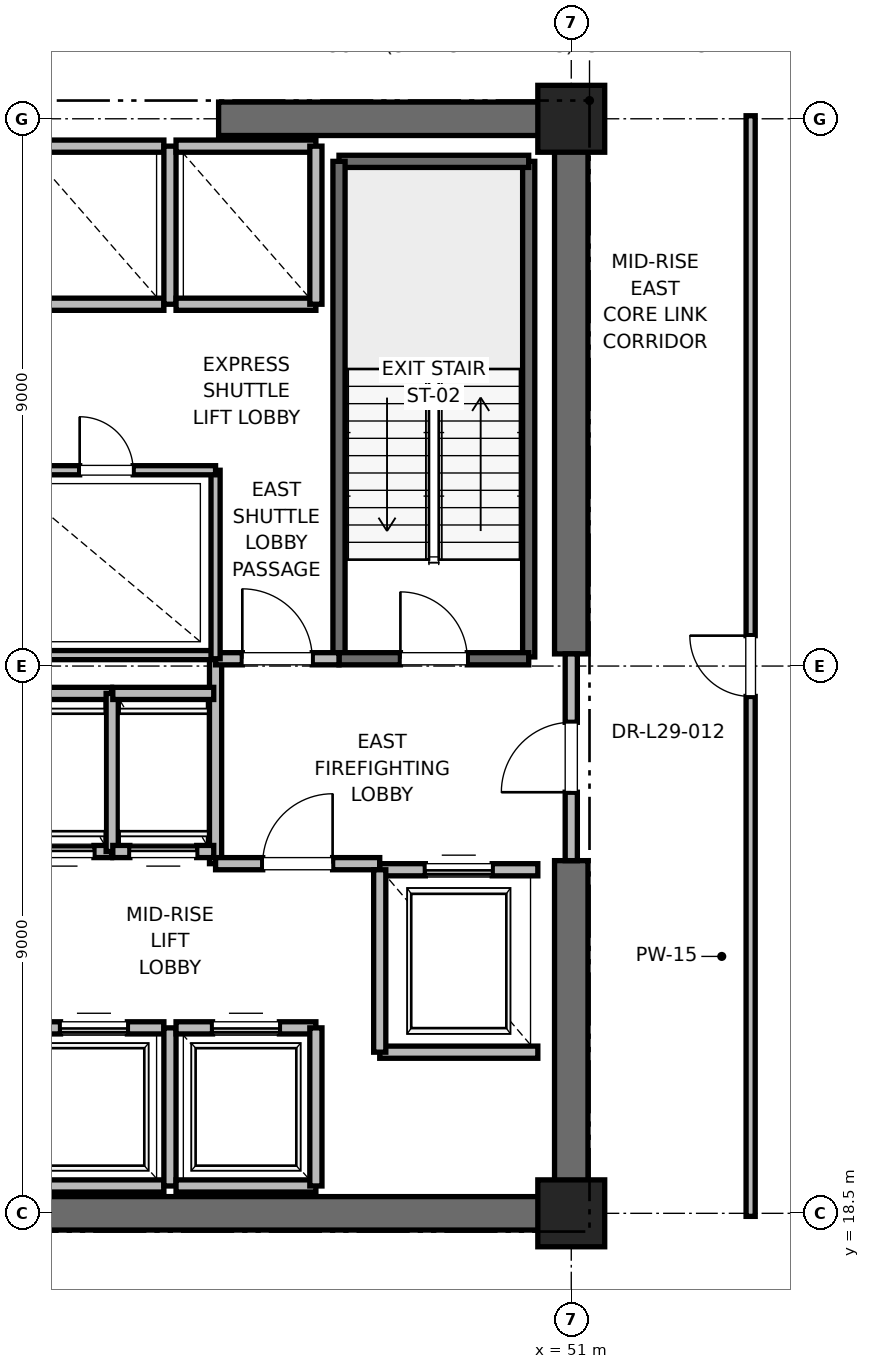
"""IFC4 building model, lengths in metres.
Left out: names, types, materials, properties, quantities, classifications, styles, units other than length and angle.
Written with IfcOpenShell. Run it as: python <this file> out.ifc"""

import sys

from ifc_helpers import new_model, si_unit, direction, frame, frame_2d, origin, origin_2d, place, context, subcontext, project, spatial, rectangle, extrude, element, fill, save


model = new_model("IFC4")
c1 = context("Model", 3, precision=1e-05, world=origin(), true_north=direction((0.0, 1.0)))
c2 = subcontext(c1, "Body", "Model", "MODEL_VIEW")
j1 = project(units=[si_unit("LENGTHUNIT", "METRE"), si_unit("PLANEANGLEUNIT", "RADIAN")], contexts=[c1])
p1 = place(None, origin())
s1 = spatial("IfcSite", under=j1, at=p1, CompositionType="ELEMENT")
p2 = place(p1, origin())
s2 = spatial("IfcBuilding", under=s1, at=p2, CompositionType="ELEMENT")
p3 = place(p2, frame((0.0, 0.0, 128.4)))
s3 = spatial("IfcBuildingStorey", under=s2, at=p3, CompositionType="ELEMENT", Elevation=128.4)
for number, where, z_axis, x_axis in (
    (1, (51.0, 18.5, 0.0), (0.0, 0.0, 1.0), (1.0, 0.0, 0.0)),
    (2, (51.0, 36.5, 0.0), (0.0, 0.0, 1.0), (1.0, 0.0, 0.0)),
):
    element("IfcColumn", number, at=place(p3, frame(where, z_axis=z_axis, x_axis=x_axis)), inside=s3, PredefinedType="PILASTER", context=c2, shape_type="SweptSolid", body=[
        extrude(rectangle(XDim=1.1, YDim=1.1, at=origin_2d()), origin(), (0.0, 0.0, 1.0), 4.0),
    ])
p4 = place(p3, frame((41.8, 18.5, 0.0), z_axis=(0.0, 0.0, 1.0), x_axis=(1.0, 0.0, 0.0)))
e3 = element("IfcWall", 3, at=p4, inside=s3, PredefinedType="SHEAR", context=c2, shape_type="SweptSolid", body=[
    extrude(rectangle(XDim=9.2, YDim=0.55, at=frame_2d((4.6, 0.0))), origin(), (0.0, 0.0, 1.0), 3.775),
])
for number, where, z_axis, x_axis in (
    (4, (45.2, 36.5, 0.0), (0.0, 0.0, 1.0), (1.0, 0.0, 0.0)),
    (5, (51.0, 18.5, 0.0), (0.0, 0.0, 1.0), (0.0, 1.0, 0.0)),
):
    element("IfcWall", number, at=place(p3, frame(where, z_axis=z_axis, x_axis=x_axis)), inside=s3, PredefinedType="SHEAR", context=c2, shape_type="SweptSolid", body=[
        extrude(rectangle(XDim=5.8, YDim=0.55, at=frame_2d((2.9, 0.0))), origin(), (0.0, 0.0, 1.0), 3.775),
    ])
p5 = place(p3, frame((51.0, 27.7, 0.0), z_axis=(0.0, 0.0, 1.0), x_axis=(0.0, 1.0, 0.0)))
e6 = element("IfcWall", 6, at=p5, inside=s3, PredefinedType="SHEAR", context=c2, shape_type="SweptSolid", body=[
    extrude(rectangle(XDim=8.8, YDim=0.55, at=frame_2d((4.4, 0.0))), origin(), (0.0, 0.0, 1.0), 3.775),
])
p6 = place(p3, frame((50.3, 27.65, 0.0), z_axis=(0.0, 0.0, 1.0), x_axis=(0.0, 1.0, 0.0)))
e7 = element("IfcWall", 7, at=p6, inside=s3, PredefinedType="SOLIDWALL", context=c2, shape_type="SweptSolid", body=[
    extrude(rectangle(XDim=8.15, YDim=0.2, at=frame_2d((4.075, 0.0))), origin(), (0.0, 0.0, 1.0), 3.775),
])
p7 = place(p3, frame((47.18, 35.8, 0.0), z_axis=(0.0, 0.0, 1.0), x_axis=(1.0, 0.0, 0.0)))
e8 = element("IfcWall", 8, at=p7, inside=s3, PredefinedType="SOLIDWALL", context=c2, shape_type="SweptSolid", body=[
    extrude(rectangle(XDim=3.12, YDim=0.2, at=frame_2d((1.56, 0.0))), origin(), (0.0, 0.0, 1.0), 3.775),
])
p8 = place(p3, frame((47.18, 27.62, 0.0), z_axis=(0.0, 0.0, 1.0), x_axis=(0.0, 1.0, 0.0)))
e9 = element("IfcWall", 9, at=p8, inside=s3, PredefinedType="SOLIDWALL", context=c2, shape_type="SweptSolid", body=[
    extrude(rectangle(XDim=8.18, YDim=0.2, at=frame_2d((4.09, 0.0))), origin(), (0.0, 0.0, 1.0), 3.775),
])
p9 = place(p3, frame((47.18, 27.62, 0.0), z_axis=(0.0, 0.0, 1.0), x_axis=(1.0, 0.0, 0.0)))
e10 = element("IfcWall", 10, at=p9, inside=s3, PredefinedType="SOLIDWALL", context=c2, shape_type="SweptSolid", body=[
    extrude(rectangle(XDim=3.12, YDim=0.2, at=frame_2d((1.56, 0.0))), origin(), (0.0, 0.0, 1.0), 3.775),
])
p10 = place(p9, frame((1.01, 0.0, 0.0)))
e11 = element("IfcOpeningElement", 11, at=p10, cuts=e10, PredefinedType="OPENING", context=c2, shape_type="SweptSolid", body=[
    extrude(rectangle(XDim=1.1, YDim=2.15, at=frame_2d((0.55, 1.075))), frame((0.0, 0.1, 0.0), z_axis=(0.0, -1.0, 0.0), x_axis=(1.0, 0.0, 0.0)), (0.0, 0.0, 1.0), 0.2),
])
p11 = place(p3, frame((45.15, 24.25, 0.0), z_axis=(0.0, 0.0, 1.0), x_axis=(0.0, 1.0, 0.0)))
e12 = element("IfcWall", 12, at=p11, inside=s3, PredefinedType="PARTITIONING", context=c2, shape_type="SweptSolid", body=[
    extrude(rectangle(XDim=3.37, YDim=0.2, at=frame_2d((1.685, 0.0))), origin(), (0.0, 0.0, 1.0), 3.775),
])
p12 = place(p3, frame((45.15, 24.25, 0.0), z_axis=(0.0, 0.0, 1.0), x_axis=(1.0, 0.0, 0.0)))
e13 = element("IfcWall", 13, at=p12, inside=s3, PredefinedType="PARTITIONING", context=c2, shape_type="SweptSolid", body=[
    extrude(rectangle(XDim=2.7, YDim=0.2, at=frame_2d((1.35, 0.0))), origin(), (0.0, 0.0, 1.0), 3.775),
])
p13 = place(p12, frame((0.775, 0.0, 0.0)))
e14 = element("IfcOpeningElement", 14, at=p13, cuts=e13, PredefinedType="OPENING", context=c2, shape_type="SweptSolid", body=[
    extrude(rectangle(XDim=1.15, YDim=2.2, at=frame_2d((0.575, 1.1))), frame((0.0, 0.1, 0.0), z_axis=(0.0, -1.0, 0.0), x_axis=(1.0, 0.0, 0.0)), (0.0, 0.0, 1.0), 0.2),
])
p14 = place(p3, frame((45.15, 27.62, 0.0), z_axis=(0.0, 0.0, 1.0), x_axis=(1.0, 0.0, 0.0)))
e15 = element("IfcWall", 15, at=p14, inside=s3, PredefinedType="PARTITIONING", context=c2, shape_type="SweptSolid", body=[
    extrude(rectangle(XDim=2.03, YDim=0.2, at=frame_2d((1.015, 0.0))), origin(), (0.0, 0.0, 1.0), 3.775),
])
p15 = place(p14, frame((0.44, 0.0, 0.0)))
e16 = element("IfcOpeningElement", 16, at=p15, cuts=e15, PredefinedType="OPENING", context=c2, shape_type="SweptSolid", body=[
    extrude(rectangle(XDim=1.15, YDim=2.2, at=frame_2d((0.575, 1.1))), frame((0.0, 0.1, 0.0), z_axis=(0.0, -1.0, 0.0), x_axis=(1.0, 0.0, 0.0)), (0.0, 0.0, 1.0), 0.2),
])
p16 = place(p3, frame((51.0, 24.3, 0.0), z_axis=(0.0, 0.0, 1.0), x_axis=(0.0, 1.0, 0.0)))
e17 = element("IfcWall", 17, at=p16, inside=s3, PredefinedType="PARTITIONING", context=c2, shape_type="SweptSolid", body=[
    extrude(rectangle(XDim=3.4, YDim=0.2, at=frame_2d((1.7, 0.0))), origin(), (0.0, 0.0, 1.0), 2.755),
])
p17 = place(p16, frame((1.125, 0.0, 0.0)))
e18 = element("IfcOpeningElement", 18, at=p17, cuts=e17, PredefinedType="OPENING", context=c2, shape_type="SweptSolid", body=[
    extrude(rectangle(XDim=1.15, YDim=2.2, at=frame_2d((0.575, 1.1))), frame((0.0, 0.1, 0.0), z_axis=(0.0, -1.0, 0.0), x_axis=(1.0, 0.0, 0.0)), (0.0, 0.0, 1.0), 0.2),
])
p18 = place(p3, frame((47.85, 21.15, 0.0), z_axis=(0.0, 0.0, 1.0), x_axis=(1.0, 0.0, 0.0)))
e19 = element("IfcWall", 19, at=p18, inside=s3, PredefinedType="SOLIDWALL", context=c2, shape_type="SweptSolid", body=[
    extrude(rectangle(XDim=2.6, YDim=0.2, at=frame_2d((1.3, 0.0))), origin(), (0.0, 0.0, 1.0), 3.775),
])
p19 = place(p3, frame((50.45, 24.15, 0.0), z_axis=(0.0, 0.0, 1.0), x_axis=(-1.0, 0.0, 0.0)))
e20 = element("IfcWall", 20, at=p19, inside=s3, PredefinedType="SOLIDWALL", context=c2, shape_type="SweptSolid", body=[
    extrude(rectangle(XDim=2.6, YDim=0.2, at=frame_2d((1.3, 0.0))), origin(), (0.0, 0.0, 1.0), 2.755),
])
p20 = place(p19, frame((0.75, 0.0, 0.0)))
e21 = element("IfcOpeningElement", 21, at=p20, cuts=e20, PredefinedType="OPENING", context=c2, shape_type="SweptSolid", body=[
    extrude(rectangle(XDim=1.1, YDim=2.2, at=frame_2d((0.55, 1.1))), frame((0.0, 0.1, 0.0), z_axis=(0.0, -1.0, 0.0), x_axis=(1.0, 0.0, 0.0)), (0.0, 0.0, 1.0), 0.2),
])
p21 = place(p3, frame((47.85, 24.15, 0.0), z_axis=(0.0, 0.0, 1.0), x_axis=(0.0, -1.0, 0.0)))
e22 = element("IfcWall", 22, at=p21, inside=s3, PredefinedType="SOLIDWALL", context=c2, shape_type="SweptSolid", body=[
    extrude(rectangle(XDim=3.0, YDim=0.2, at=frame_2d((1.5, 0.0))), origin(), (0.0, 0.0, 1.0), 3.775),
])
p22 = place(p3, frame((42.0, 18.95, 0.0), z_axis=(0.0, 0.0, 1.0), x_axis=(1.0, 0.0, 0.0)))
e23 = element("IfcWall", 23, at=p22, inside=s3, PredefinedType="SOLIDWALL", context=c2, shape_type="SweptSolid", body=[
    extrude(rectangle(XDim=2.3, YDim=0.2, at=frame_2d((1.15, 0.0))), origin(), (0.0, 0.0, 1.0), 2.755),
])
p23 = place(p3, frame((44.3, 21.55, 0.0), z_axis=(0.0, 0.0, 1.0), x_axis=(-1.0, 0.0, 0.0)))
e24 = element("IfcWall", 24, at=p23, inside=s3, PredefinedType="SOLIDWALL", context=c2, shape_type="SweptSolid", body=[
    extrude(rectangle(XDim=2.3, YDim=0.2, at=frame_2d((1.15, 0.0))), origin(), (0.0, 0.0, 1.0), 3.775),
])
p24 = place(p23, frame((0.6, 0.0, 0.0)))
e25 = element("IfcOpeningElement", 25, at=p24, cuts=e24, PredefinedType="OPENING", context=c2, shape_type="SweptSolid", body=[
    extrude(rectangle(XDim=1.1, YDim=2.2, at=frame_2d((0.55, 1.1))), frame((0.0, 0.1, 0.0), z_axis=(0.0, -1.0, 0.0), x_axis=(1.0, 0.0, 0.0)), (0.0, 0.0, 1.0), 0.2),
])
p25 = place(p3, frame((44.4, 18.95, 0.0), z_axis=(0.0, 0.0, 1.0), x_axis=(0.0, 1.0, 0.0)))
e26 = element("IfcWall", 26, at=p25, inside=s3, PredefinedType="SOLIDWALL", context=c2, shape_type="SweptSolid", body=[
    extrude(rectangle(XDim=2.6, YDim=0.2, at=frame_2d((1.3, 0.0))), origin(), (0.0, 0.0, 1.0), 3.775),
])
p26 = place(p3, frame((44.5, 18.95, 0.0), z_axis=(0.0, 0.0, 1.0), x_axis=(1.0, 0.0, 0.0)))
e27 = element("IfcWall", 27, at=p26, inside=s3, PredefinedType="SOLIDWALL", context=c2, shape_type="SweptSolid", body=[
    extrude(rectangle(XDim=2.3, YDim=0.2, at=frame_2d((1.15, 0.0))), origin(), (0.0, 0.0, 1.0), 3.775),
])
p27 = place(p3, frame((46.8, 21.55, 0.0), z_axis=(0.0, 0.0, 1.0), x_axis=(-1.0, 0.0, 0.0)))
e28 = element("IfcWall", 28, at=p27, inside=s3, PredefinedType="SOLIDWALL", context=c2, shape_type="SweptSolid", body=[
    extrude(rectangle(XDim=2.3, YDim=0.2, at=frame_2d((1.15, 0.0))), origin(), (0.0, 0.0, 1.0), 3.775),
])
p28 = place(p27, frame((0.6, 0.0, 0.0)))
e29 = element("IfcOpeningElement", 29, at=p28, cuts=e28, PredefinedType="OPENING", context=c2, shape_type="SweptSolid", body=[
    extrude(rectangle(XDim=1.1, YDim=2.2, at=frame_2d((0.55, 1.1))), frame((0.0, 0.1, 0.0), z_axis=(0.0, -1.0, 0.0), x_axis=(1.0, 0.0, 0.0)), (0.0, 0.0, 1.0), 0.2),
])
p29 = place(p3, frame((46.8, 18.95, 0.0), z_axis=(0.0, 0.0, 1.0), x_axis=(0.0, 1.0, 0.0)))
e30 = element("IfcWall", 30, at=p29, inside=s3, PredefinedType="SOLIDWALL", context=c2, shape_type="SweptSolid", body=[
    extrude(rectangle(XDim=2.6, YDim=0.2, at=frame_2d((1.3, 0.0))), origin(), (0.0, 0.0, 1.0), 3.775),
])
p30 = place(p3, frame((41.76, 24.45, 0.0), z_axis=(0.0, 0.0, 1.0), x_axis=(1.0, 0.0, 0.0)))
e31 = element("IfcWall", 31, at=p30, inside=s3, PredefinedType="SOLIDWALL", context=c2, shape_type="SweptSolid", body=[
    extrude(rectangle(XDim=1.68, YDim=0.2, at=frame_2d((0.84, 0.0))), origin(), (0.0, 0.0, 1.0), 3.775),
])
p31 = place(p30, frame((0.29, 0.0, 0.0)))
e32 = element("IfcOpeningElement", 32, at=p31, cuts=e31, PredefinedType="OPENING", context=c2, shape_type="SweptSolid", body=[
    extrude(rectangle(XDim=1.1, YDim=2.2, at=frame_2d((0.55, 1.1))), frame((0.0, 0.1, 0.0), z_axis=(0.0, -1.0, 0.0), x_axis=(1.0, 0.0, 0.0)), (0.0, 0.0, 1.0), 0.2),
])
p32 = place(p3, frame((43.44, 27.05, 0.0), z_axis=(0.0, 0.0, 1.0), x_axis=(-1.0, 0.0, 0.0)))
e33 = element("IfcWall", 33, at=p32, inside=s3, PredefinedType="SOLIDWALL", context=c2, shape_type="SweptSolid", body=[
    extrude(rectangle(XDim=1.68, YDim=0.2, at=frame_2d((0.84, 0.0))), origin(), (0.0, 0.0, 1.0), 3.775),
])
p33 = place(p3, frame((43.45, 24.45, 0.0), z_axis=(0.0, 0.0, 1.0), x_axis=(0.0, 1.0, 0.0)))
e34 = element("IfcWall", 34, at=p33, inside=s3, PredefinedType="SOLIDWALL", context=c2, shape_type="SweptSolid", body=[
    extrude(rectangle(XDim=2.6, YDim=0.2, at=frame_2d((1.3, 0.0))), origin(), (0.0, 0.0, 1.0), 3.775),
])
p34 = place(p3, frame((43.46, 24.45, 0.0), z_axis=(0.0, 0.0, 1.0), x_axis=(1.0, 0.0, 0.0)))
e35 = element("IfcWall", 35, at=p34, inside=s3, PredefinedType="SOLIDWALL", context=c2, shape_type="SweptSolid", body=[
    extrude(rectangle(XDim=1.66, YDim=0.2, at=frame_2d((0.83, 0.0))), origin(), (0.0, 0.0, 1.0), 3.775),
])
p35 = place(p34, frame((0.28, 0.0, 0.0)))
e36 = element("IfcOpeningElement", 36, at=p35, cuts=e35, PredefinedType="OPENING", context=c2, shape_type="SweptSolid", body=[
    extrude(rectangle(XDim=1.1, YDim=2.2, at=frame_2d((0.55, 1.1))), frame((0.0, 0.1, 0.0), z_axis=(0.0, -1.0, 0.0), x_axis=(1.0, 0.0, 0.0)), (0.0, 0.0, 1.0), 0.2),
])
p36 = place(p3, frame((45.12, 27.05, 0.0), z_axis=(0.0, 0.0, 1.0), x_axis=(-1.0, 0.0, 0.0)))
e37 = element("IfcWall", 37, at=p36, inside=s3, PredefinedType="SOLIDWALL", context=c2, shape_type="SweptSolid", body=[
    extrude(rectangle(XDim=1.66, YDim=0.2, at=frame_2d((0.83, 0.0))), origin(), (0.0, 0.0, 1.0), 3.775),
])
p37 = place(p3, frame((42.0, 33.45, 0.0), z_axis=(0.0, 0.0, 1.0), x_axis=(1.0, 0.0, 0.0)))
e38 = element("IfcWall", 38, at=p37, inside=s3, PredefinedType="SOLIDWALL", context=c2, shape_type="SweptSolid", body=[
    extrude(rectangle(XDim=2.3, YDim=0.2, at=frame_2d((1.15, 0.0))), origin(), (0.0, 0.0, 1.0), 3.775),
])
p38 = place(p3, frame((44.3, 36.05, 0.0), z_axis=(0.0, 0.0, 1.0), x_axis=(-1.0, 0.0, 0.0)))
e39 = element("IfcWall", 39, at=p38, inside=s3, PredefinedType="SOLIDWALL", context=c2, shape_type="SweptSolid", body=[
    extrude(rectangle(XDim=2.3, YDim=0.2, at=frame_2d((1.15, 0.0))), origin(), (0.0, 0.0, 1.0), 2.755),
])
p39 = place(p3, frame((44.4, 33.45, 0.0), z_axis=(0.0, 0.0, 1.0), x_axis=(0.0, 1.0, 0.0)))
e40 = element("IfcWall", 40, at=p39, inside=s3, PredefinedType="SOLIDWALL", context=c2, shape_type="SweptSolid", body=[
    extrude(rectangle(XDim=2.6, YDim=0.2, at=frame_2d((1.3, 0.0))), origin(), (0.0, 0.0, 1.0), 2.755),
])
p40 = place(p3, frame((44.5, 33.45, 0.0), z_axis=(0.0, 0.0, 1.0), x_axis=(1.0, 0.0, 0.0)))
e41 = element("IfcWall", 41, at=p40, inside=s3, PredefinedType="SOLIDWALL", context=c2, shape_type="SweptSolid", body=[
    extrude(rectangle(XDim=2.3, YDim=0.2, at=frame_2d((1.15, 0.0))), origin(), (0.0, 0.0, 1.0), 3.775),
])
p41 = place(p3, frame((46.8, 36.05, 0.0), z_axis=(0.0, 0.0, 1.0), x_axis=(-1.0, 0.0, 0.0)))
e42 = element("IfcWall", 42, at=p41, inside=s3, PredefinedType="SOLIDWALL", context=c2, shape_type="SweptSolid", body=[
    extrude(rectangle(XDim=2.3, YDim=0.2, at=frame_2d((1.15, 0.0))), origin(), (0.0, 0.0, 1.0), 2.755),
])
p42 = place(p3, frame((46.8, 33.45, 0.0), z_axis=(0.0, 0.0, 1.0), x_axis=(0.0, 1.0, 0.0)))
e43 = element("IfcWall", 43, at=p42, inside=s3, PredefinedType="SOLIDWALL", context=c2, shape_type="SweptSolid", body=[
    extrude(rectangle(XDim=2.6, YDim=0.2, at=frame_2d((1.3, 0.0))), origin(), (0.0, 0.0, 1.0), 3.775),
])
p43 = place(p3, frame((41.56, 27.68, 0.0), z_axis=(0.0, 0.0, 1.0), x_axis=(1.0, 0.0, 0.0)))
e44 = element("IfcWall", 44, at=p43, inside=s3, PredefinedType="PARTITIONING", context=c2, shape_type="SweptSolid", body=[
    extrude(rectangle(XDim=3.59, YDim=0.15, at=frame_2d((1.795, 0.0))), origin(), (0.0, 0.0, 1.0), 2.85),
])
p44 = place(p3, frame((45.15, 27.62, 0.0), z_axis=(0.0, 0.0, 1.0), x_axis=(0.0, 1.0, 0.0)))
e45 = element("IfcWall", 45, at=p44, inside=s3, PredefinedType="PARTITIONING", context=c2, shape_type="SweptSolid", body=[
    extrude(rectangle(XDim=3.1, YDim=0.15, at=frame_2d((1.55, 0.0))), origin(), (0.0, 0.0, 1.0), 2.85),
])
p45 = place(p3, frame((41.56, 30.72, 0.0), z_axis=(0.0, 0.0, 1.0), x_axis=(1.0, 0.0, 0.0)))
e46 = element("IfcWall", 46, at=p45, inside=s3, PredefinedType="PARTITIONING", context=c2, shape_type="SweptSolid", body=[
    extrude(rectangle(XDim=3.59, YDim=0.15, at=frame_2d((1.795, 0.0))), origin(), (0.0, 0.0, 1.0), 2.85),
])
p46 = place(p45, frame((1.355, 0.0, 0.0)))
e47 = element("IfcOpeningElement", 47, at=p46, cuts=e46, PredefinedType="OPENING", context=c2, shape_type="SweptSolid", body=[
    extrude(rectangle(XDim=0.88, YDim=2.1, at=frame_2d((0.44, 1.05))), frame((0.0, 0.075, 0.0), z_axis=(0.0, -1.0, 0.0), x_axis=(1.0, 0.0, 0.0)), (0.0, 0.0, 1.0), 0.15),
])
p47 = place(p3, frame((53.95, 18.45, 0.0), z_axis=(0.0, 0.0, 1.0), x_axis=(0.0, 1.0, 0.0)))
e48 = element("IfcWall", 48, at=p47, inside=s3, PredefinedType="PARTITIONING", context=c2, shape_type="SweptSolid", body=[
    extrude(rectangle(XDim=18.1, YDim=0.15, at=frame_2d((9.05, 0.0))), origin(), (0.0, 0.0, 1.0), 2.85),
])
p48 = place(p47, frame((8.55, 0.0, 0.0)))
e49 = element("IfcOpeningElement", 49, at=p48, cuts=e48, PredefinedType="OPENING", context=c2, shape_type="SweptSolid", body=[
    extrude(rectangle(XDim=1.0, YDim=2.15, at=frame_2d((0.5, 1.075))), frame((0.0, 0.075, 0.0), z_axis=(0.0, -1.0, 0.0), x_axis=(1.0, 0.0, 0.0)), (0.0, 0.0, 1.0), 0.15),
])
p49 = place(p10, origin())
e50 = element("IfcDoor", 50, at=p49, inside=s3, OperationType="SINGLE_SWING_LEFT", PredefinedType="DOOR", context=c2, shape_type="SweptSolid", body=[
    extrude(rectangle(XDim=1.1, YDim=2.15, at=frame_2d((0.55, 1.075))), frame((0.0, 0.025, 0.0), z_axis=(0.0, -1.0, 0.0), x_axis=(1.0, 0.0, 0.0)), (0.0, 0.0, 1.0), 0.05),
])
fill(e11, e50)
p50 = place(p13, origin())
e51 = element("IfcDoor", 51, at=p50, inside=s3, OperationType="SINGLE_SWING_RIGHT", PredefinedType="DOOR", context=c2, shape_type="SweptSolid", body=[
    extrude(rectangle(XDim=1.15, YDim=2.2, at=frame_2d((0.575, 1.1))), frame((0.0, 0.025, 0.0), z_axis=(0.0, -1.0, 0.0), x_axis=(1.0, 0.0, 0.0)), (0.0, 0.0, 1.0), 0.05),
])
fill(e14, e51)
p51 = place(p15, origin())
e52 = element("IfcDoor", 52, at=p51, inside=s3, OperationType="SINGLE_SWING_LEFT", PredefinedType="DOOR", context=c2, shape_type="SweptSolid", body=[
    extrude(rectangle(XDim=1.15, YDim=2.2, at=frame_2d((0.575, 1.1))), frame((0.0, 0.025, 0.0), z_axis=(0.0, -1.0, 0.0), x_axis=(1.0, 0.0, 0.0)), (0.0, 0.0, 1.0), 0.05),
])
fill(e16, e52)
p52 = place(p17, origin())
e53 = element("IfcDoor", 53, at=p52, inside=s3, OperationType="SINGLE_SWING_LEFT", PredefinedType="DOOR", context=c2, shape_type="SweptSolid", body=[
    extrude(rectangle(XDim=1.15, YDim=2.2, at=frame_2d((0.575, 1.1))), frame((0.0, 0.025, 0.0), z_axis=(0.0, -1.0, 0.0), x_axis=(1.0, 0.0, 0.0)), (0.0, 0.0, 1.0), 0.05),
])
fill(e18, e53)
p53 = place(p20, origin())
e54 = element("IfcDoor", 54, at=p53, inside=s3, OperationType="SLIDING_TO_RIGHT", PredefinedType="DOOR", context=c2, shape_type="SweptSolid", body=[
    extrude(rectangle(XDim=1.1, YDim=2.2, at=frame_2d((0.55, 1.1))), frame((0.0, 0.025, 0.0), z_axis=(0.0, -1.0, 0.0), x_axis=(1.0, 0.0, 0.0)), (0.0, 0.0, 1.0), 0.05),
])
fill(e21, e54)
p54 = place(p24, origin())
e55 = element("IfcDoor", 55, at=p54, inside=s3, OperationType="SLIDING_TO_RIGHT", PredefinedType="DOOR", context=c2, shape_type="SweptSolid", body=[
    extrude(rectangle(XDim=1.1, YDim=2.2, at=frame_2d((0.55, 1.1))), frame((0.0, 0.025, 0.0), z_axis=(0.0, -1.0, 0.0), x_axis=(1.0, 0.0, 0.0)), (0.0, 0.0, 1.0), 0.05),
])
fill(e25, e55)
p55 = place(p28, origin())
e56 = element("IfcDoor", 56, at=p55, inside=s3, OperationType="SLIDING_TO_RIGHT", PredefinedType="DOOR", context=c2, shape_type="SweptSolid", body=[
    extrude(rectangle(XDim=1.1, YDim=2.2, at=frame_2d((0.55, 1.1))), frame((0.0, 0.025, 0.0), z_axis=(0.0, -1.0, 0.0), x_axis=(1.0, 0.0, 0.0)), (0.0, 0.0, 1.0), 0.05),
])
fill(e29, e56)
p56 = place(p31, origin())
e57 = element("IfcDoor", 57, at=p56, inside=s3, OperationType="SLIDING_TO_RIGHT", PredefinedType="DOOR", context=c2, shape_type="SweptSolid", body=[
    extrude(rectangle(XDim=1.1, YDim=2.2, at=frame_2d((0.55, 1.1))), frame((0.0, 0.025, 0.0), z_axis=(0.0, -1.0, 0.0), x_axis=(1.0, 0.0, 0.0)), (0.0, 0.0, 1.0), 0.05),
])
fill(e32, e57)
p57 = place(p35, origin())
e58 = element("IfcDoor", 58, at=p57, inside=s3, OperationType="SLIDING_TO_RIGHT", PredefinedType="DOOR", context=c2, shape_type="SweptSolid", body=[
    extrude(rectangle(XDim=1.1, YDim=2.2, at=frame_2d((0.55, 1.1))), frame((0.0, 0.025, 0.0), z_axis=(0.0, -1.0, 0.0), x_axis=(1.0, 0.0, 0.0)), (0.0, 0.0, 1.0), 0.05),
])
fill(e36, e58)
p58 = place(p46, origin())
e59 = element("IfcDoor", 59, at=p58, inside=s3, OperationType="SINGLE_SWING_LEFT", PredefinedType="DOOR", context=c2, shape_type="SweptSolid", body=[
    extrude(rectangle(XDim=0.88, YDim=2.1, at=frame_2d((0.44, 1.05))), frame((0.0, 0.025, 0.0), z_axis=(0.0, -1.0, 0.0), x_axis=(1.0, 0.0, 0.0)), (0.0, 0.0, 1.0), 0.05),
])
fill(e47, e59)
p59 = place(p48, origin())
e60 = element("IfcDoor", 60, at=p59, inside=s3, OperationType="SINGLE_SWING_RIGHT", PredefinedType="DOOR", context=c2, shape_type="SweptSolid", body=[
    extrude(rectangle(XDim=1.0, YDim=2.15, at=frame_2d((0.5, 1.075))), frame((0.0, 0.025, 0.0), z_axis=(0.0, -1.0, 0.0), x_axis=(1.0, 0.0, 0.0)), (0.0, 0.0, 1.0), 0.05),
])
fill(e49, e60)
save(model, sys.argv[1])
